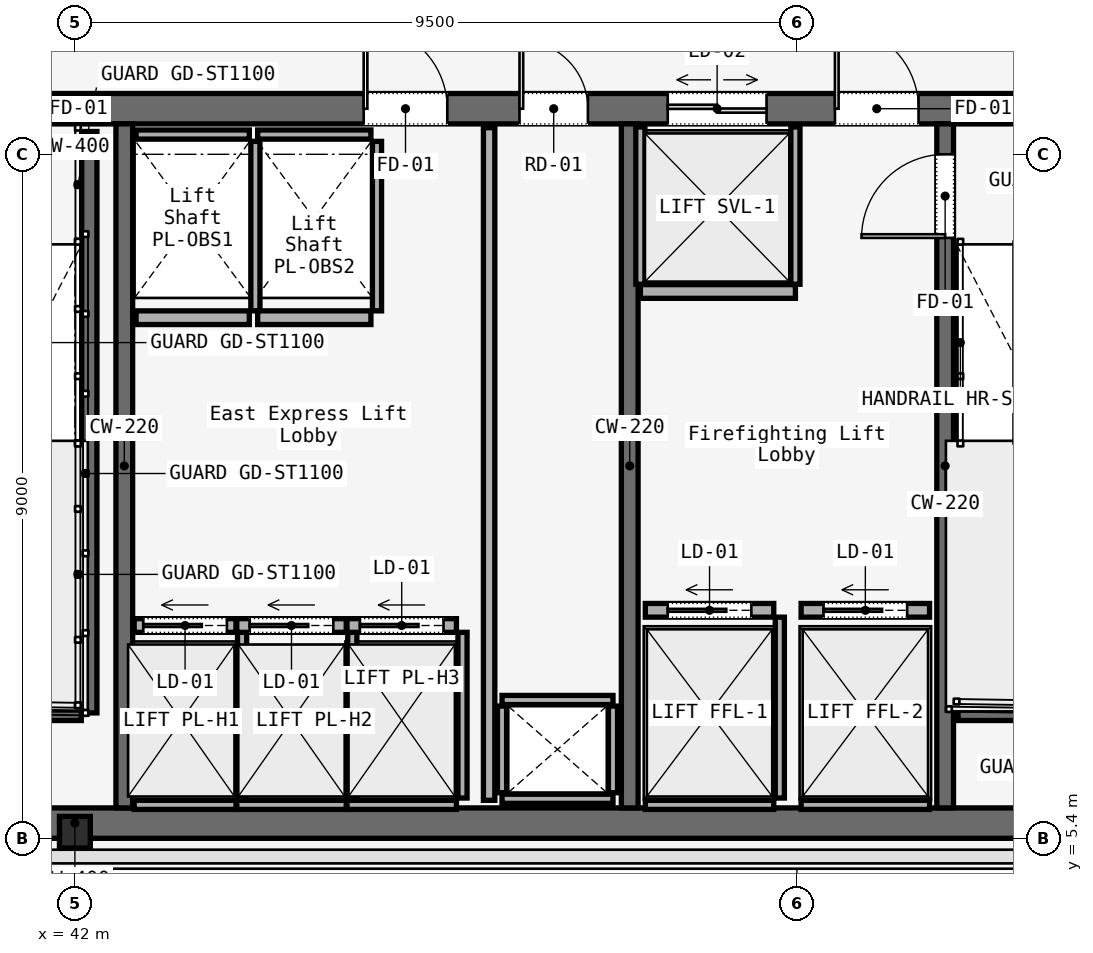
"""IFC4 building model, lengths in metres.
Left out: names, types, materials, properties, quantities, classifications, styles, units other than length and angle.
Written with IfcOpenShell. Run it as: python <this file> out.ifc"""

import sys

from ifc_helpers import new_model, si_unit, direction, frame, frame_2d, origin, origin_2d, place, context, subcontext, project, spatial, rectangle, i_section, extrude, element, fill, save


model = new_model("IFC4")
c1 = context("Model", 3, precision=1e-05, world=origin(), true_north=direction((0.0, 1.0)))
c2 = subcontext(c1, "Body", "Model", "MODEL_VIEW")
j1 = project(units=[si_unit("LENGTHUNIT", "METRE"), si_unit("PLANEANGLEUNIT", "RADIAN")], contexts=[c1])
p1 = place(None, origin())
s1 = spatial("IfcSite", under=j1, at=p1, CompositionType="ELEMENT")
p2 = place(p1, origin())
s2 = spatial("IfcBuilding", under=s1, at=p2, CompositionType="ELEMENT")
p3 = place(p2, frame((0.0, 0.0, 252.2)))
s3 = spatial("IfcBuildingStorey", under=s2, at=p3, CompositionType="ELEMENT", Elevation=252.2)
p4 = place(p3, frame((26.45, 15.0, 0.0), z_axis=(0.0, 0.0, 1.0), x_axis=(1.0, 0.0, 0.0)))
e1 = element("IfcWall", 1, at=p4, inside=s3, PredefinedType="SOLIDWALL", context=c2, shape_type="SweptSolid", body=[
    extrude(rectangle(XDim=31.1, YDim=0.4, at=frame_2d((15.55, 0.0))), origin(), (0.0, 0.0, 1.0), 3.58),
])
p5 = place(p4, frame((1.65, 0.0, 0.0)))
e2 = element("IfcOpeningElement", 2, at=p5, cuts=e1, PredefinedType="OPENING", context=c2, shape_type="SweptSolid", body=[
    extrude(rectangle(XDim=1.1, YDim=2.2, at=frame_2d((0.55, 1.1))), frame((0.0, 0.2, 0.0), z_axis=(0.0, -1.0, 0.0), x_axis=(1.0, 0.0, 0.0)), (0.0, 0.0, 1.0), 0.4),
])
p6 = place(p4, frame((13.65, 0.0, 0.0)))
e3 = element("IfcOpeningElement", 3, at=p6, cuts=e1, PredefinedType="OPENING", context=c2, shape_type="SweptSolid", body=[
    extrude(rectangle(XDim=1.1, YDim=2.2, at=frame_2d((0.55, 1.1))), frame((0.0, 0.2, 0.0), z_axis=(0.0, -1.0, 0.0), x_axis=(1.0, 0.0, 0.0)), (0.0, 0.0, 1.0), 0.4),
])
p7 = place(p4, frame((25.55, 0.0, 0.0)))
e4 = element("IfcOpeningElement", 4, at=p7, cuts=e1, PredefinedType="OPENING", context=c2, shape_type="SweptSolid", body=[
    extrude(rectangle(XDim=1.1, YDim=2.2, at=frame_2d((0.55, 1.1))), frame((0.0, 0.2, 0.0), z_axis=(0.0, -1.0, 0.0), x_axis=(1.0, 0.0, 0.0)), (0.0, 0.0, 1.0), 0.4),
])
p8 = place(p4, frame((19.35, 0.0, 0.0)))
e5 = element("IfcOpeningElement", 5, at=p8, cuts=e1, PredefinedType="OPENING", context=c2, shape_type="SweptSolid", body=[
    extrude(rectangle(XDim=1.1, YDim=2.2, at=frame_2d((0.55, 1.1))), frame((0.0, 0.2, 0.0), z_axis=(0.0, -1.0, 0.0), x_axis=(1.0, 0.0, 0.0)), (0.0, 0.0, 1.0), 0.4),
])
p9 = place(p4, frame((21.4, 0.0, 0.0)))
e6 = element("IfcOpeningElement", 6, at=p9, cuts=e1, PredefinedType="OPENING", context=c2, shape_type="SweptSolid", body=[
    extrude(rectangle(XDim=0.9, YDim=2.1, at=frame_2d((0.45, 1.05))), frame((0.0, 0.2, 0.0), z_axis=(0.0, -1.0, 0.0), x_axis=(1.0, 0.0, 0.0)), (0.0, 0.0, 1.0), 0.4),
])
p10 = place(p4, frame((6.54, 0.0, 0.0)))
e7 = element("IfcOpeningElement", 7, at=p10, cuts=e1, PredefinedType="OPENING", context=c2, shape_type="SweptSolid", body=[
    extrude(rectangle(XDim=0.95, YDim=2.2, at=frame_2d((0.475, 1.1))), frame((0.0, 0.2, 0.0), z_axis=(0.0, -1.0, 0.0), x_axis=(1.0, 0.0, 0.0)), (0.0, 0.0, 1.0), 0.4),
])
p11 = place(p4, frame((10.49, 0.0, 0.0)))
e8 = element("IfcOpeningElement", 8, at=p11, cuts=e1, PredefinedType="OPENING", context=c2, shape_type="SweptSolid", body=[
    extrude(rectangle(XDim=0.95, YDim=2.2, at=frame_2d((0.475, 1.1))), frame((0.0, 0.2, 0.0), z_axis=(0.0, -1.0, 0.0), x_axis=(1.0, 0.0, 0.0)), (0.0, 0.0, 1.0), 0.4),
])
p12 = place(p4, frame((23.35, 0.0, 0.0)))
e9 = element("IfcOpeningElement", 9, at=p12, cuts=e1, PredefinedType="OPENING", context=c2, shape_type="SweptSolid", body=[
    extrude(rectangle(XDim=1.3, YDim=2.3, at=frame_2d((0.65, 1.15))), frame((0.0, 0.2, 0.0), z_axis=(0.0, -1.0, 0.0), x_axis=(1.0, 0.0, 0.0)), (0.0, 0.0, 1.0), 0.4),
])
p13 = place(p3, frame((26.45, 5.6, 0.0), z_axis=(0.0, 0.0, 1.0), x_axis=(1.0, 0.0, 0.0)))
e10 = element("IfcWall", 10, at=p13, inside=s3, PredefinedType="SOLIDWALL", context=c2, shape_type="SweptSolid", body=[
    extrude(rectangle(XDim=31.1, YDim=0.4, at=frame_2d((15.55, 0.0))), origin(), (0.0, 0.0, 1.0), 3.58),
])
for number, where, z_axis, x_axis in (
    (11, (42.65, 5.8, 0.0), (0.0, 0.0, 1.0), (0.0, 1.0, 0.0)),
    (12, (49.3, 5.8, 0.0), (0.0, 0.0, 1.0), (0.0, 1.0, 0.0)),
):
    element("IfcWall", number, at=place(p3, frame(where, z_axis=z_axis, x_axis=x_axis)), inside=s3, PredefinedType="SOLIDWALL", context=c2, shape_type="SweptSolid", body=[
        extrude(rectangle(XDim=9.0, YDim=0.22, at=frame_2d((4.5, 0.0))), origin(), (0.0, 0.0, 1.0), 3.58),
    ])
p14 = place(p3, frame((53.45, 5.8, 0.0), z_axis=(0.0, 0.0, 1.0), x_axis=(0.0, 1.0, 0.0)))
e13 = element("IfcWall", 13, at=p14, inside=s3, PredefinedType="SOLIDWALL", context=c2, shape_type="SweptSolid", body=[
    extrude(rectangle(XDim=9.0, YDim=0.22, at=frame_2d((4.5, 0.0))), origin(), (0.0, 0.0, 1.0), 3.58),
])
p15 = place(p14, frame((7.5, 0.0, 0.0)))
e14 = element("IfcOpeningElement", 14, at=p15, cuts=e13, PredefinedType="OPENING", context=c2, shape_type="SweptSolid", body=[
    extrude(rectangle(XDim=1.1, YDim=2.2, at=frame_2d((0.55, 1.1))), frame((0.0, 0.11, 0.0), z_axis=(0.0, -1.0, 0.0), x_axis=(1.0, 0.0, 0.0)), (0.0, 0.0, 1.0), 0.22),
])
p16 = place(p3, frame((42.0, 5.48, 0.0), z_axis=(0.0, 0.0, 1.0), x_axis=(1.0, 0.0, 0.0)))
e15 = element("IfcColumn", 15, at=p16, inside=s3, PredefinedType="COLUMN", context=c2, shape_type="SweptSolid", body=[
    extrude(i_section(OverallWidth=0.406, OverallDepth=0.416, WebThickness=0.03, FlangeThickness=0.037, FilletRadius=0.015, at=origin_2d()), origin(), (0.0, 0.0, 1.0), 3.58),
])
p17 = place(p3, frame((42.19, 14.7, 0.0), z_axis=(0.0, 0.0, 1.0), x_axis=(0.0, -1.0, 0.0)))
e16 = element("IfcWall", 16, at=p17, inside=s3, PredefinedType="SOLIDWALL", context=c2, shape_type="SweptSolid", body=[
    extrude(rectangle(XDim=7.65, YDim=0.2, at=frame_2d((3.825, 0.0))), origin(), (0.0, 0.0, 1.0), 3.8),
])
for number, where, z_axis, x_axis in (
    (17, (38.97, 7.05, 0.0), (0.0, 0.0, 1.0), (1.0, 0.0, 0.0)),
    (18, (53.62, 7.05, 0.0), (0.0, 0.0, 1.0), (1.0, 0.0, 0.0)),
):
    element("IfcWall", number, at=place(p3, frame(where, z_axis=z_axis, x_axis=x_axis)), inside=s3, PredefinedType="SOLIDWALL", context=c2, shape_type="SweptSolid", body=[
        extrude(rectangle(XDim=3.115, YDim=0.2, at=frame_2d((1.558, 0.0))), origin(), (0.0, 0.0, 1.0), 3.8),
    ])
for number, where, z_axis, x_axis in (
    (19, (47.62, 5.92, 0.0), (0.0, 0.0, 1.0), (1.0, 0.0, 0.0)),
    (20, (47.62, 7.22, 0.0), (0.0, 0.0, 1.0), (1.0, 0.0, 0.0)),
):
    element("IfcWall", number, at=place(p3, frame(where, z_axis=z_axis, x_axis=x_axis)), inside=s3, PredefinedType="SOLIDWALL", context=c2, shape_type="SweptSolid", body=[
        extrude(rectangle(XDim=1.46, YDim=0.12, at=frame_2d((0.73, 0.0))), origin(), (0.0, 0.0, 1.0), 3.01),
    ])
for number, where, z_axis, x_axis in (
    (21, (47.62, 6.0, 0.0), (0.0, 0.0, 1.0), (0.0, 1.0, 0.0)),
    (22, (49.08, 6.0, 0.0), (0.0, 0.0, 1.0), (0.0, 1.0, 0.0)),
):
    element("IfcWall", number, at=place(p3, frame(where, z_axis=z_axis, x_axis=x_axis)), inside=s3, PredefinedType="SOLIDWALL", context=c2, shape_type="SweptSolid", body=[
        extrude(rectangle(XDim=1.14, YDim=0.12, at=frame_2d((0.57, 0.0))), origin(), (0.0, 0.0, 1.0), 3.01),
    ])
p18 = place(p3, frame((47.45, 5.9, 0.0), z_axis=(0.0, 0.0, 1.0), x_axis=(0.0, 1.0, 0.0)))
e23 = element("IfcWall", 23, at=p18, inside=s3, PredefinedType="PARTITIONING", context=c2, shape_type="SweptSolid", body=[
    extrude(rectangle(XDim=8.85, YDim=0.15, at=frame_2d((4.425, 0.0))), origin(), (0.0, 0.0, 1.0), 3.01),
])
p19 = place(p3, frame((42.78, 8.2, 0.0), z_axis=(0.0, 0.0, 1.0), x_axis=(1.0, 0.0, 0.0)))
e24 = element("IfcWall", 24, at=p19, inside=s3, PredefinedType="SOLIDWALL", context=c2, shape_type="SweptSolid", body=[
    extrude(rectangle(XDim=1.34, YDim=0.18, at=frame_2d((0.67, 0.0))), origin(), (0.0, 0.0, 1.0), 3.01),
])
p20 = place(p19, frame((0.12, 0.0, 0.0)))
e25 = element("IfcOpeningElement", 25, at=p20, cuts=e24, PredefinedType="OPENING", context=c2, shape_type="SweptSolid", body=[
    extrude(rectangle(XDim=1.1, YDim=2.2, at=frame_2d((0.55, 1.1))), frame((0.0, 0.09, 0.0), z_axis=(0.0, -1.0, 0.0), x_axis=(1.0, 0.0, 0.0)), (0.0, 0.0, 1.0), 0.18),
])
p21 = place(p3, frame((42.78, 5.84, 0.0), z_axis=(0.0, 0.0, 1.0), x_axis=(1.0, 0.0, 0.0)))
e26 = element("IfcWall", 26, at=p21, inside=s3, PredefinedType="SOLIDWALL", context=c2, shape_type="SweptSolid", body=[
    extrude(rectangle(XDim=1.34, YDim=0.12, at=frame_2d((0.67, 0.0))), origin(), (0.0, 0.0, 1.0), 3.01),
])
p22 = place(p3, frame((44.2, 5.93, 0.0), z_axis=(0.0, 0.0, 1.0), x_axis=(0.0, 1.0, 0.0)))
e27 = element("IfcWall", 27, at=p22, inside=s3, PredefinedType="SOLIDWALL", context=c2, shape_type="SweptSolid", body=[
    extrude(rectangle(XDim=2.18, YDim=0.12, at=frame_2d((1.09, 0.0))), origin(), (0.0, 0.0, 1.0), 3.01),
])
p23 = place(p3, frame((44.13, 8.2, 0.0), z_axis=(0.0, 0.0, 1.0), x_axis=(1.0, 0.0, 0.0)))
e28 = element("IfcWall", 28, at=p23, inside=s3, PredefinedType="SOLIDWALL", context=c2, shape_type="SweptSolid", body=[
    extrude(rectangle(XDim=1.44, YDim=0.18, at=frame_2d((0.72, 0.0))), origin(), (0.0, 0.0, 1.0), 3.01),
])
p24 = place(p23, frame((0.17, 0.0, 0.0)))
e29 = element("IfcOpeningElement", 29, at=p24, cuts=e28, PredefinedType="OPENING", context=c2, shape_type="SweptSolid", body=[
    extrude(rectangle(XDim=1.1, YDim=2.2, at=frame_2d((0.55, 1.1))), frame((0.0, 0.09, 0.0), z_axis=(0.0, -1.0, 0.0), x_axis=(1.0, 0.0, 0.0)), (0.0, 0.0, 1.0), 0.18),
])
p25 = place(p3, frame((44.13, 5.84, 0.0), z_axis=(0.0, 0.0, 1.0), x_axis=(1.0, 0.0, 0.0)))
e30 = element("IfcWall", 30, at=p25, inside=s3, PredefinedType="SOLIDWALL", context=c2, shape_type="SweptSolid", body=[
    extrude(rectangle(XDim=1.44, YDim=0.12, at=frame_2d((0.72, 0.0))), origin(), (0.0, 0.0, 1.0), 3.01),
])
p26 = place(p3, frame((45.65, 5.93, 0.0), z_axis=(0.0, 0.0, 1.0), x_axis=(0.0, 1.0, 0.0)))
e31 = element("IfcWall", 31, at=p26, inside=s3, PredefinedType="SOLIDWALL", context=c2, shape_type="SweptSolid", body=[
    extrude(rectangle(XDim=2.18, YDim=0.12, at=frame_2d((1.09, 0.0))), origin(), (0.0, 0.0, 1.0), 3.01),
])
p27 = place(p3, frame((45.58, 8.2, 0.0), z_axis=(0.0, 0.0, 1.0), x_axis=(1.0, 0.0, 0.0)))
e32 = element("IfcWall", 32, at=p27, inside=s3, PredefinedType="SOLIDWALL", context=c2, shape_type="SweptSolid", body=[
    extrude(rectangle(XDim=1.44, YDim=0.18, at=frame_2d((0.72, 0.0))), origin(), (0.0, 0.0, 1.0), 3.01),
])
p28 = place(p27, frame((0.17, 0.0, 0.0)))
e33 = element("IfcOpeningElement", 33, at=p28, cuts=e32, PredefinedType="OPENING", context=c2, shape_type="SweptSolid", body=[
    extrude(rectangle(XDim=1.1, YDim=2.2, at=frame_2d((0.55, 1.1))), frame((0.0, 0.09, 0.0), z_axis=(0.0, -1.0, 0.0), x_axis=(1.0, 0.0, 0.0)), (0.0, 0.0, 1.0), 0.18),
])
p29 = place(p3, frame((45.58, 5.84, 0.0), z_axis=(0.0, 0.0, 1.0), x_axis=(1.0, 0.0, 0.0)))
e34 = element("IfcWall", 34, at=p29, inside=s3, PredefinedType="SOLIDWALL", context=c2, shape_type="SweptSolid", body=[
    extrude(rectangle(XDim=1.44, YDim=0.12, at=frame_2d((0.72, 0.0))), origin(), (0.0, 0.0, 1.0), 3.01),
])
p30 = place(p3, frame((47.1, 5.93, 0.0), z_axis=(0.0, 0.0, 1.0), x_axis=(0.0, 1.0, 0.0)))
e35 = element("IfcWall", 35, at=p30, inside=s3, PredefinedType="SOLIDWALL", context=c2, shape_type="SweptSolid", body=[
    extrude(rectangle(XDim=2.18, YDim=0.12, at=frame_2d((1.09, 0.0))), origin(), (0.0, 0.0, 1.0), 3.01),
])
p31 = place(p3, frame((42.805, 12.25, 0.0), z_axis=(0.0, 0.0, 1.0), x_axis=(1.0, 0.0, 0.0)))
e36 = element("IfcWall", 36, at=p31, inside=s3, PredefinedType="SOLIDWALL", context=c2, shape_type="SweptSolid", body=[
    extrude(rectangle(XDim=1.49, YDim=0.18, at=frame_2d((0.745, 0.0))), origin(), (0.0, 0.0, 1.0), 3.01),
])
p32 = place(p3, frame((42.805, 14.66, 0.0), z_axis=(0.0, 0.0, 1.0), x_axis=(1.0, 0.0, 0.0)))
e37 = element("IfcWall", 37, at=p32, inside=s3, PredefinedType="SOLIDWALL", context=c2, shape_type="SweptSolid", body=[
    extrude(rectangle(XDim=1.49, YDim=0.12, at=frame_2d((0.745, 0.0))), origin(), (0.0, 0.0, 1.0), 3.01),
])
p33 = place(p3, frame((44.375, 12.34, 0.0), z_axis=(0.0, 0.0, 1.0), x_axis=(0.0, 1.0, 0.0)))
e38 = element("IfcWall", 38, at=p33, inside=s3, PredefinedType="SOLIDWALL", context=c2, shape_type="SweptSolid", body=[
    extrude(rectangle(XDim=2.23, YDim=0.12, at=frame_2d((1.115, 0.0))), origin(), (0.0, 0.0, 1.0), 3.01),
])
p34 = place(p3, frame((44.405, 12.25, 0.0), z_axis=(0.0, 0.0, 1.0), x_axis=(1.0, 0.0, 0.0)))
e39 = element("IfcWall", 39, at=p34, inside=s3, PredefinedType="SOLIDWALL", context=c2, shape_type="SweptSolid", body=[
    extrude(rectangle(XDim=1.49, YDim=0.18, at=frame_2d((0.745, 0.0))), origin(), (0.0, 0.0, 1.0), 3.01),
])
p35 = place(p3, frame((44.405, 14.66, 0.0), z_axis=(0.0, 0.0, 1.0), x_axis=(1.0, 0.0, 0.0)))
e40 = element("IfcWall", 40, at=p35, inside=s3, PredefinedType="SOLIDWALL", context=c2, shape_type="SweptSolid", body=[
    extrude(rectangle(XDim=1.49, YDim=0.12, at=frame_2d((0.745, 0.0))), origin(), (0.0, 0.0, 1.0), 3.01),
])
p36 = place(p3, frame((45.975, 12.34, 0.0), z_axis=(0.0, 0.0, 1.0), x_axis=(0.0, 1.0, 0.0)))
e41 = element("IfcWall", 41, at=p36, inside=s3, PredefinedType="SOLIDWALL", context=c2, shape_type="SweptSolid", body=[
    extrude(rectangle(XDim=2.23, YDim=0.12, at=frame_2d((1.115, 0.0))), origin(), (0.0, 0.0, 1.0), 3.01),
])
p37 = place(p3, frame((49.505, 8.4, 0.0), z_axis=(0.0, 0.0, 1.0), x_axis=(1.0, 0.0, 0.0)))
e42 = element("IfcWall", 42, at=p37, inside=s3, PredefinedType="SOLIDWALL", context=c2, shape_type="SweptSolid", body=[
    extrude(rectangle(XDim=1.69, YDim=0.18, at=frame_2d((0.845, 0.0))), origin(), (0.0, 0.0, 1.0), 3.01),
])
p38 = place(p37, frame((0.295, 0.0, 0.0)))
e43 = element("IfcOpeningElement", 43, at=p38, cuts=e42, PredefinedType="OPENING", context=c2, shape_type="SweptSolid", body=[
    extrude(rectangle(XDim=1.1, YDim=2.2, at=frame_2d((0.55, 1.1))), frame((0.0, 0.09, 0.0), z_axis=(0.0, -1.0, 0.0), x_axis=(1.0, 0.0, 0.0)), (0.0, 0.0, 1.0), 0.18),
])
p39 = place(p3, frame((49.505, 5.84, 0.0), z_axis=(0.0, 0.0, 1.0), x_axis=(1.0, 0.0, 0.0)))
e44 = element("IfcWall", 44, at=p39, inside=s3, PredefinedType="SOLIDWALL", context=c2, shape_type="SweptSolid", body=[
    extrude(rectangle(XDim=1.69, YDim=0.12, at=frame_2d((0.845, 0.0))), origin(), (0.0, 0.0, 1.0), 3.01),
])
p40 = place(p3, frame((51.275, 5.93, 0.0), z_axis=(0.0, 0.0, 1.0), x_axis=(0.0, 1.0, 0.0)))
e45 = element("IfcWall", 45, at=p40, inside=s3, PredefinedType="SOLIDWALL", context=c2, shape_type="SweptSolid", body=[
    extrude(rectangle(XDim=2.38, YDim=0.12, at=frame_2d((1.19, 0.0))), origin(), (0.0, 0.0, 1.0), 3.01),
])
p41 = place(p3, frame((51.555, 8.4, 0.0), z_axis=(0.0, 0.0, 1.0), x_axis=(1.0, 0.0, 0.0)))
e46 = element("IfcWall", 46, at=p41, inside=s3, PredefinedType="SOLIDWALL", context=c2, shape_type="SweptSolid", body=[
    extrude(rectangle(XDim=1.69, YDim=0.18, at=frame_2d((0.845, 0.0))), origin(), (0.0, 0.0, 1.0), 3.01),
])
p42 = place(p41, frame((0.295, 0.0, 0.0)))
e47 = element("IfcOpeningElement", 47, at=p42, cuts=e46, PredefinedType="OPENING", context=c2, shape_type="SweptSolid", body=[
    extrude(rectangle(XDim=1.1, YDim=2.2, at=frame_2d((0.55, 1.1))), frame((0.0, 0.09, 0.0), z_axis=(0.0, -1.0, 0.0), x_axis=(1.0, 0.0, 0.0)), (0.0, 0.0, 1.0), 0.18),
])
p43 = place(p3, frame((51.555, 5.84, 0.0), z_axis=(0.0, 0.0, 1.0), x_axis=(1.0, 0.0, 0.0)))
e48 = element("IfcWall", 48, at=p43, inside=s3, PredefinedType="SOLIDWALL", context=c2, shape_type="SweptSolid", body=[
    extrude(rectangle(XDim=1.69, YDim=0.12, at=frame_2d((0.845, 0.0))), origin(), (0.0, 0.0, 1.0), 3.01),
])
p44 = place(p3, frame((49.44, 12.595, 0.0), z_axis=(0.0, 0.0, 1.0), x_axis=(1.0, 0.0, 0.0)))
e49 = element("IfcWall", 49, at=p44, inside=s3, PredefinedType="SOLIDWALL", context=c2, shape_type="SweptSolid", body=[
    extrude(rectangle(XDim=2.04, YDim=0.18, at=frame_2d((1.02, 0.0))), origin(), (0.0, 0.0, 1.0), 3.01),
])
for number, where, z_axis, x_axis in (
    (50, (49.44, 12.69, 0.0), (0.0, 0.0, 1.0), (0.0, 1.0, 0.0)),
    (51, (51.48, 12.69, 0.0), (0.0, 0.0, 1.0), (0.0, 1.0, 0.0)),
):
    element("IfcWall", number, at=place(p3, frame(where, z_axis=z_axis, x_axis=x_axis)), inside=s3, PredefinedType="SOLIDWALL", context=c2, shape_type="SweptSolid", body=[
        extrude(rectangle(XDim=2.07, YDim=0.12, at=frame_2d((1.035, 0.0))), origin(), (0.0, 0.0, 1.0), 3.01),
    ])
p45 = place(p7, origin())
e52 = element("IfcDoor", 52, at=p45, inside=s3, OperationType="SINGLE_SWING_RIGHT", PredefinedType="DOOR", context=c2, shape_type="SweptSolid", body=[
    extrude(rectangle(XDim=1.1, YDim=2.2, at=frame_2d((0.55, 1.1))), frame((0.0, 0.025, 0.0), z_axis=(0.0, -1.0, 0.0), x_axis=(1.0, 0.0, 0.0)), (0.0, 0.0, 1.0), 0.05),
])
fill(e4, e52)
p46 = place(p8, origin())
e53 = element("IfcDoor", 53, at=p46, inside=s3, OperationType="SINGLE_SWING_LEFT", PredefinedType="DOOR", context=c2, shape_type="SweptSolid", body=[
    extrude(rectangle(XDim=1.1, YDim=2.2, at=frame_2d((0.55, 1.1))), frame((0.0, 0.025, 0.0), z_axis=(0.0, -1.0, 0.0), x_axis=(1.0, 0.0, 0.0)), (0.0, 0.0, 1.0), 0.05),
])
fill(e5, e53)
p47 = place(p9, origin())
e54 = element("IfcDoor", 54, at=p47, inside=s3, OperationType="SINGLE_SWING_LEFT", PredefinedType="DOOR", context=c2, shape_type="SweptSolid", body=[
    extrude(rectangle(XDim=0.9, YDim=2.1, at=frame_2d((0.45, 1.05))), frame((0.0, 0.025, 0.0), z_axis=(0.0, -1.0, 0.0), x_axis=(1.0, 0.0, 0.0)), (0.0, 0.0, 1.0), 0.05),
])
fill(e6, e54)
p48 = place(p15, origin())
e55 = element("IfcDoor", 55, at=p48, inside=s3, OperationType="SINGLE_SWING_LEFT", PredefinedType="DOOR", context=c2, shape_type="SweptSolid", body=[
    extrude(rectangle(XDim=1.1, YDim=2.2, at=frame_2d((0.55, 1.1))), frame((0.0, 0.025, 0.0), z_axis=(0.0, -1.0, 0.0), x_axis=(1.0, 0.0, 0.0)), (0.0, 0.0, 1.0), 0.05),
])
fill(e14, e55)
p49 = place(p20, origin())
e56 = element("IfcDoor", 56, at=p49, inside=s3, OperationType="SLIDING_TO_LEFT", PredefinedType="DOOR", context=c2, shape_type="SweptSolid", body=[
    extrude(rectangle(XDim=1.1, YDim=2.2, at=frame_2d((0.55, 1.1))), frame((0.0, 0.025, 0.0), z_axis=(0.0, -1.0, 0.0), x_axis=(1.0, 0.0, 0.0)), (0.0, 0.0, 1.0), 0.05),
])
fill(e25, e56)
p50 = place(p24, origin())
e57 = element("IfcDoor", 57, at=p50, inside=s3, OperationType="SLIDING_TO_LEFT", PredefinedType="DOOR", context=c2, shape_type="SweptSolid", body=[
    extrude(rectangle(XDim=1.1, YDim=2.2, at=frame_2d((0.55, 1.1))), frame((0.0, 0.025, 0.0), z_axis=(0.0, -1.0, 0.0), x_axis=(1.0, 0.0, 0.0)), (0.0, 0.0, 1.0), 0.05),
])
fill(e29, e57)
p51 = place(p28, origin())
e58 = element("IfcDoor", 58, at=p51, inside=s3, OperationType="SLIDING_TO_LEFT", PredefinedType="DOOR", context=c2, shape_type="SweptSolid", body=[
    extrude(rectangle(XDim=1.1, YDim=2.2, at=frame_2d((0.55, 1.1))), frame((0.0, 0.025, 0.0), z_axis=(0.0, -1.0, 0.0), x_axis=(1.0, 0.0, 0.0)), (0.0, 0.0, 1.0), 0.05),
])
fill(e33, e58)
p52 = place(p38, origin())
e59 = element("IfcDoor", 59, at=p52, inside=s3, OperationType="SLIDING_TO_LEFT", PredefinedType="DOOR", context=c2, shape_type="SweptSolid", body=[
    extrude(rectangle(XDim=1.1, YDim=2.2, at=frame_2d((0.55, 1.1))), frame((0.0, 0.025, 0.0), z_axis=(0.0, -1.0, 0.0), x_axis=(1.0, 0.0, 0.0)), (0.0, 0.0, 1.0), 0.05),
])
fill(e43, e59)
p53 = place(p42, origin())
e60 = element("IfcDoor", 60, at=p53, inside=s3, OperationType="SLIDING_TO_LEFT", PredefinedType="DOOR", context=c2, shape_type="SweptSolid", body=[
    extrude(rectangle(XDim=1.1, YDim=2.2, at=frame_2d((0.55, 1.1))), frame((0.0, 0.025, 0.0), z_axis=(0.0, -1.0, 0.0), x_axis=(1.0, 0.0, 0.0)), (0.0, 0.0, 1.0), 0.05),
])
fill(e47, e60)
p54 = place(p12, origin())
e61 = element("IfcDoor", 61, at=p54, inside=s3, OperationType="DOUBLE_DOOR_SLIDING", PredefinedType="DOOR", context=c2, shape_type="SweptSolid", body=[
    extrude(rectangle(XDim=1.3, YDim=2.3, at=frame_2d((0.65, 1.15))), frame((0.0, 0.025, 0.0), z_axis=(0.0, -1.0, 0.0), x_axis=(1.0, 0.0, 0.0)), (0.0, 0.0, 1.0), 0.05),
])
fill(e9, e61)
save(model, sys.argv[1])
